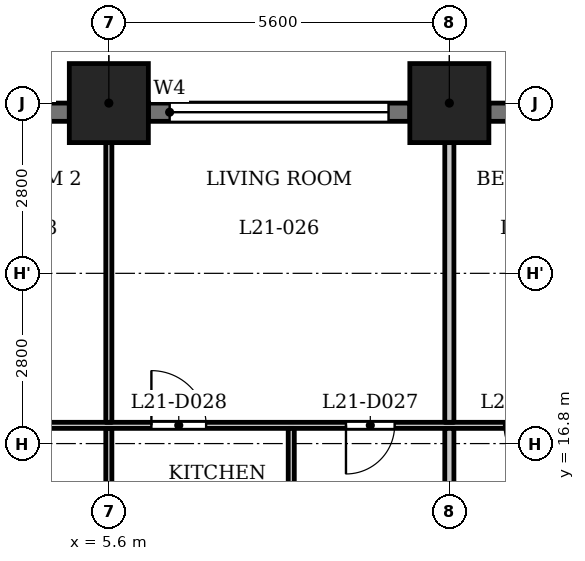
"""IFC4 building model, lengths in metres.
Left out: names, types, materials, properties, quantities, classifications, styles, units other than length and angle.
Written with IfcOpenShell. Run it as: python <this file> out.ifc"""

import sys

from ifc_helpers import new_model, si_unit, direction, frame, frame_2d, origin, origin_2d, place, context, subcontext, project, spatial, rectangle, extrude, element, fill, save


model = new_model("IFC4")
c1 = context("Model", 3, precision=1e-05, world=origin(), true_north=direction((0.0, 1.0)))
c2 = subcontext(c1, "Body", "Model", "MODEL_VIEW")
j1 = project(units=[si_unit("LENGTHUNIT", "METRE"), si_unit("PLANEANGLEUNIT", "RADIAN")], contexts=[c1])
p1 = place(None, origin())
s1 = spatial("IfcSite", under=j1, at=p1, CompositionType="ELEMENT")
p2 = place(p1, origin())
s2 = spatial("IfcBuilding", under=s1, at=p2, CompositionType="ELEMENT")
p3 = place(p2, frame((0.0, 0.0, 86.8)))
s3 = spatial("IfcBuildingStorey", under=s2, at=p3, CompositionType="ELEMENT", Elevation=86.8)
for number, where, z_axis, x_axis in (
    (1, (11.2, 22.4, 0.0), (0.0, 0.0, 1.0), (1.0, 0.0, 0.0)),
    (2, (5.6, 22.4, 0.0), (0.0, 0.0, 1.0), (1.0, 0.0, 0.0)),
):
    element("IfcColumn", number, at=place(p3, frame(where, z_axis=z_axis, x_axis=x_axis)), inside=s3, PredefinedType="COLUMN", context=c2, shape_type="SweptSolid", body=[
        extrude(rectangle(XDim=1.3, YDim=1.3, at=origin_2d()), origin(), (0.0, 0.0, 1.0), 3.5),
    ])
p4 = place(p3, frame((16.15, 22.25, 0.0), z_axis=(0.0, 0.0, 1.0), x_axis=(-1.0, 0.0, 0.0)))
e3 = element("IfcWall", 3, at=p4, inside=s3, PredefinedType="SOLIDWALL", context=c2, shape_type="SweptSolid", body=[
    extrude(rectangle(XDim=4.3, YDim=0.3, at=frame_2d((2.15, 0.0))), origin(), (0.0, 0.0, 1.0), 2.4),
])
p5 = place(p4, frame((0.337, 0.0, 0.6)))
e4 = element("IfcOpeningElement", 4, at=p5, cuts=e3, PredefinedType="OPENING", context=c2, shape_type="SweptSolid", body=[
    extrude(rectangle(XDim=1.2, YDim=1.55, at=frame_2d((0.6, 0.775))), frame((0.0, 0.16, 0.0), z_axis=(0.0, -1.0, 0.0), x_axis=(1.0, 0.0, 0.0)), (0.0, 0.0, 1.0), 0.32),
])
p6 = place(p4, frame((2.562, 0.0, 0.6)))
e5 = element("IfcOpeningElement", 5, at=p6, cuts=e3, PredefinedType="OPENING", context=c2, shape_type="SweptSolid", body=[
    extrude(rectangle(XDim=1.2, YDim=1.55, at=frame_2d((0.6, 0.775))), frame((0.0, 0.16, 0.0), z_axis=(0.0, -1.0, 0.0), x_axis=(1.0, 0.0, 0.0)), (0.0, 0.0, 1.0), 0.32),
])
p7 = place(p3, frame((10.55, 22.25, 0.0), z_axis=(0.0, 0.0, 1.0), x_axis=(-1.0, 0.0, 0.0)))
e6 = element("IfcWall", 6, at=p7, inside=s3, PredefinedType="SOLIDWALL", context=c2, shape_type="SweptSolid", body=[
    extrude(rectangle(XDim=4.3, YDim=0.3, at=frame_2d((2.15, 0.0))), origin(), (0.0, 0.0, 1.0), 2.4),
])
p8 = place(p7, frame((0.35, 0.0, 1.2)))
e7 = element("IfcOpeningElement", 7, at=p8, cuts=e6, PredefinedType="OPENING", context=c2, shape_type="SweptSolid", body=[
    extrude(rectangle(XDim=3.6, YDim=0.95, at=frame_2d((1.8, 0.475))), frame((0.0, 0.16, 0.0), z_axis=(0.0, -1.0, 0.0), x_axis=(1.0, 0.0, 0.0)), (0.0, 0.0, 1.0), 0.32),
])
p9 = place(p3, frame((4.95, 22.25, 0.0), z_axis=(0.0, 0.0, 1.0), x_axis=(-1.0, 0.0, 0.0)))
e8 = element("IfcWall", 8, at=p9, inside=s3, PredefinedType="SOLIDWALL", context=c2, shape_type="SweptSolid", body=[
    extrude(rectangle(XDim=4.3, YDim=0.3, at=frame_2d((2.15, 0.0))), origin(), (0.0, 0.0, 1.0), 2.4),
])
p10 = place(p9, frame((0.538, 0.0, 0.6)))
e9 = element("IfcOpeningElement", 9, at=p10, cuts=e8, PredefinedType="OPENING", context=c2, shape_type="SweptSolid", body=[
    extrude(rectangle(XDim=1.2, YDim=1.55, at=frame_2d((0.6, 0.775))), frame((0.0, 0.16, 0.0), z_axis=(0.0, -1.0, 0.0), x_axis=(1.0, 0.0, 0.0)), (0.0, 0.0, 1.0), 0.32),
])
p11 = place(p9, frame((2.762, 0.0, 0.6)))
e10 = element("IfcOpeningElement", 10, at=p11, cuts=e8, PredefinedType="OPENING", context=c2, shape_type="SweptSolid", body=[
    extrude(rectangle(XDim=1.2, YDim=1.55, at=frame_2d((0.6, 0.775))), frame((0.0, 0.16, 0.0), z_axis=(0.0, -1.0, 0.0), x_axis=(1.0, 0.0, 0.0)), (0.0, 0.0, 1.0), 0.32),
])
p12 = place(p3, frame((-16.725, 17.1, 0.0), z_axis=(0.0, 0.0, 1.0), x_axis=(1.0, 0.0, 0.0)))
e11 = element("IfcWall", 11, at=p12, inside=s3, PredefinedType="PARTITIONING", context=c2, shape_type="SweptSolid", body=[
    extrude(rectangle(XDim=33.45, YDim=0.1, at=frame_2d((16.725, 0.0))), origin(), (0.0, 0.0, 1.0), 3.2),
])
p13 = place(p12, frame((3.925, 0.0, 0.0)))
e12 = element("IfcOpeningElement", 12, at=p13, cuts=e11, PredefinedType="OPENING", context=c2, shape_type="SweptSolid", body=[
    extrude(rectangle(XDim=0.8, YDim=2.1, at=frame_2d((0.4, 1.05))), frame((0.0, 0.06, 0.0), z_axis=(0.0, -1.0, 0.0), x_axis=(1.0, 0.0, 0.0)), (0.0, 0.0, 1.0), 0.12),
])
p14 = place(p12, frame((0.975, 0.0, 0.0)))
e13 = element("IfcOpeningElement", 13, at=p14, cuts=e11, PredefinedType="OPENING", context=c2, shape_type="SweptSolid", body=[
    extrude(rectangle(XDim=0.9, YDim=2.1, at=frame_2d((0.45, 1.05))), frame((0.0, 0.06, 0.0), z_axis=(0.0, -1.0, 0.0), x_axis=(1.0, 0.0, 0.0)), (0.0, 0.0, 1.0), 0.12),
])
p15 = place(p12, frame((6.425, 0.0, 0.0)))
e14 = element("IfcOpeningElement", 14, at=p15, cuts=e11, PredefinedType="OPENING", context=c2, shape_type="SweptSolid", body=[
    extrude(rectangle(XDim=0.8, YDim=2.1, at=frame_2d((0.4, 1.05))), frame((0.0, 0.06, 0.0), z_axis=(0.0, -1.0, 0.0), x_axis=(1.0, 0.0, 0.0)), (0.0, 0.0, 1.0), 0.12),
])
p16 = place(p12, frame((8.825, 0.0, 0.0)))
e15 = element("IfcOpeningElement", 15, at=p16, cuts=e11, PredefinedType="OPENING", context=c2, shape_type="SweptSolid", body=[
    extrude(rectangle(XDim=0.9, YDim=2.1, at=frame_2d((0.45, 1.05))), frame((0.0, 0.06, 0.0), z_axis=(0.0, -1.0, 0.0), x_axis=(1.0, 0.0, 0.0)), (0.0, 0.0, 1.0), 0.12),
])
p17 = place(p12, frame((12.375, 0.0, 0.0)))
e16 = element("IfcOpeningElement", 16, at=p17, cuts=e11, PredefinedType="OPENING", context=c2, shape_type="SweptSolid", body=[
    extrude(rectangle(XDim=0.9, YDim=2.1, at=frame_2d((0.45, 1.05))), frame((0.0, 0.06, 0.0), z_axis=(0.0, -1.0, 0.0), x_axis=(1.0, 0.0, 0.0)), (0.0, 0.0, 1.0), 0.12),
])
p18 = place(p12, frame((14.425, 0.0, 0.0)))
e17 = element("IfcOpeningElement", 17, at=p18, cuts=e11, PredefinedType="OPENING", context=c2, shape_type="SweptSolid", body=[
    extrude(rectangle(XDim=0.9, YDim=2.1, at=frame_2d((0.45, 1.05))), frame((0.0, 0.06, 0.0), z_axis=(0.0, -1.0, 0.0), x_axis=(1.0, 0.0, 0.0)), (0.0, 0.0, 1.0), 0.12),
])
p19 = place(p12, frame((26.225, 0.0, 0.0)))
e18 = element("IfcOpeningElement", 18, at=p19, cuts=e11, PredefinedType="OPENING", context=c2, shape_type="SweptSolid", body=[
    extrude(rectangle(XDim=0.8, YDim=2.1, at=frame_2d((0.4, 1.05))), frame((0.0, 0.06, 0.0), z_axis=(0.0, -1.0, 0.0), x_axis=(1.0, 0.0, 0.0)), (0.0, 0.0, 1.0), 0.12),
])
p20 = place(p12, frame((23.025, 0.0, 0.0)))
e19 = element("IfcOpeningElement", 19, at=p20, cuts=e11, PredefinedType="OPENING", context=c2, shape_type="SweptSolid", body=[
    extrude(rectangle(XDim=0.9, YDim=2.1, at=frame_2d((0.45, 1.05))), frame((0.0, 0.06, 0.0), z_axis=(0.0, -1.0, 0.0), x_axis=(1.0, 0.0, 0.0)), (0.0, 0.0, 1.0), 0.12),
])
p21 = place(p12, frame((17.775, 0.0, 0.0)))
e20 = element("IfcOpeningElement", 20, at=p21, cuts=e11, PredefinedType="OPENING", context=c2, shape_type="SweptSolid", body=[
    extrude(rectangle(XDim=0.9, YDim=2.1, at=frame_2d((0.45, 1.05))), frame((0.0, 0.06, 0.0), z_axis=(0.0, -1.0, 0.0), x_axis=(1.0, 0.0, 0.0)), (0.0, 0.0, 1.0), 0.12),
])
p22 = place(p12, frame((20.025, 0.0, 0.0)))
e21 = element("IfcOpeningElement", 21, at=p22, cuts=e11, PredefinedType="OPENING", context=c2, shape_type="SweptSolid", body=[
    extrude(rectangle(XDim=0.9, YDim=2.1, at=frame_2d((0.45, 1.05))), frame((0.0, 0.06, 0.0), z_axis=(0.0, -1.0, 0.0), x_axis=(1.0, 0.0, 0.0)), (0.0, 0.0, 1.0), 0.12),
])
p23 = place(p12, frame((28.825, 0.0, 0.0)))
e22 = element("IfcOpeningElement", 22, at=p23, cuts=e11, PredefinedType="OPENING", context=c2, shape_type="SweptSolid", body=[
    extrude(rectangle(XDim=0.8, YDim=2.1, at=frame_2d((0.4, 1.05))), frame((0.0, 0.06, 0.0), z_axis=(0.0, -1.0, 0.0), x_axis=(1.0, 0.0, 0.0)), (0.0, 0.0, 1.0), 0.12),
])
p24 = place(p12, frame((31.975, 0.0, 0.0)))
e23 = element("IfcOpeningElement", 23, at=p24, cuts=e11, PredefinedType="OPENING", context=c2, shape_type="SweptSolid", body=[
    extrude(rectangle(XDim=0.9, YDim=2.1, at=frame_2d((0.45, 1.05))), frame((0.0, 0.06, 0.0), z_axis=(0.0, -1.0, 0.0), x_axis=(1.0, 0.0, 0.0)), (0.0, 0.0, 1.0), 0.12),
])
p25 = place(p3, frame((5.6, 13.275, 0.0), z_axis=(0.0, 0.0, 1.0), x_axis=(0.0, 1.0, 0.0)))
e24 = element("IfcWall", 24, at=p25, inside=s3, PredefinedType="PARTITIONING", context=c2, shape_type="SweptSolid", body=[
    extrude(rectangle(XDim=3.775, YDim=0.1, at=frame_2d((1.888, 0.0))), origin(), (0.0, 0.0, 1.0), 3.2),
])
p26 = place(p25, frame((0.576, 0.0, 0.0)))
e25 = element("IfcOpeningElement", 25, at=p26, cuts=e24, PredefinedType="OPENING", context=c2, shape_type="SweptSolid", body=[
    extrude(rectangle(XDim=0.9, YDim=2.1, at=frame_2d((0.45, 1.05))), frame((0.0, 0.06, 0.0), z_axis=(0.0, -1.0, 0.0), x_axis=(1.0, 0.0, 0.0)), (0.0, 0.0, 1.0), 0.12),
])
p27 = place(p3, frame((5.6, 17.15, 0.0), z_axis=(0.0, 0.0, 1.0), x_axis=(0.0, 1.0, 0.0)))
e26 = element("IfcWall", 26, at=p27, inside=s3, PredefinedType="PARTITIONING", context=c2, shape_type="SweptSolid", body=[
    extrude(rectangle(XDim=5.88, YDim=0.1, at=frame_2d((2.94, 0.0))), origin(), (0.0, 0.0, 1.0), 3.2),
])
p28 = place(p3, frame((8.6, 13.275, 0.0), z_axis=(0.0, 0.0, 1.0), x_axis=(0.0, 1.0, 0.0)))
e27 = element("IfcWall", 27, at=p28, inside=s3, PredefinedType="PARTITIONING", context=c2, shape_type="SweptSolid", body=[
    extrude(rectangle(XDim=3.775, YDim=0.1, at=frame_2d((1.888, 0.0))), origin(), (0.0, 0.0, 1.0), 3.2),
])
p29 = place(p3, frame((11.2, 13.275, 0.0), z_axis=(0.0, 0.0, 1.0), x_axis=(0.0, 1.0, 0.0)))
e28 = element("IfcWall", 28, at=p29, inside=s3, PredefinedType="PARTITIONING", context=c2, shape_type="SweptSolid", body=[
    extrude(rectangle(XDim=3.775, YDim=0.15, at=frame_2d((1.888, 0.0))), origin(), (0.0, 0.0, 1.0), 3.2),
])
p30 = place(p3, frame((11.2, 17.15, 0.0), z_axis=(0.0, 0.0, 1.0), x_axis=(0.0, 1.0, 0.0)))
e29 = element("IfcWall", 29, at=p30, inside=s3, PredefinedType="PARTITIONING", context=c2, shape_type="SweptSolid", body=[
    extrude(rectangle(XDim=5.88, YDim=0.15, at=frame_2d((2.94, 0.0))), origin(), (0.0, 0.0, 1.0), 3.2),
])
p31 = place(p19, origin())
e30 = element("IfcDoor", 30, at=p31, inside=s3, OperationType="SINGLE_SWING_LEFT", PredefinedType="DOOR", context=c2, shape_type="SweptSolid", body=[
    extrude(rectangle(XDim=0.8, YDim=2.1, at=frame_2d((0.4, 1.05))), frame((0.0, 0.025, 0.0), z_axis=(0.0, -1.0, 0.0), x_axis=(1.0, 0.0, 0.0)), (0.0, 0.0, 1.0), 0.05),
])
fill(e18, e30)
p32 = place(p20, origin())
e31 = element("IfcDoor", 31, at=p32, inside=s3, OperationType="SINGLE_SWING_RIGHT", PredefinedType="DOOR", context=c2, shape_type="SweptSolid", body=[
    extrude(rectangle(XDim=0.9, YDim=2.1, at=frame_2d((0.45, 1.05))), frame((0.0, 0.025, 0.0), z_axis=(0.0, -1.0, 0.0), x_axis=(1.0, 0.0, 0.0)), (0.0, 0.0, 1.0), 0.05),
])
fill(e19, e31)
p33 = place(p23, origin())
e32 = element("IfcDoor", 32, at=p33, inside=s3, OperationType="SINGLE_SWING_RIGHT", PredefinedType="DOOR", context=c2, shape_type="SweptSolid", body=[
    extrude(rectangle(XDim=0.8, YDim=2.1, at=frame_2d((0.4, 1.05))), frame((0.0, 0.025, 0.0), z_axis=(0.0, -1.0, 0.0), x_axis=(1.0, 0.0, 0.0)), (0.0, 0.0, 1.0), 0.05),
])
fill(e22, e32)
p34 = place(p8, origin())
e33 = element("IfcWindow", 33, at=p34, inside=s3, PartitioningType="SINGLE_PANEL", PredefinedType="WINDOW", context=c2, shape_type="SweptSolid", body=[
    extrude(rectangle(XDim=3.6, YDim=0.95, at=frame_2d((1.8, 0.475))), frame((0.0, 0.03, 0.0), z_axis=(0.0, -1.0, 0.0), x_axis=(1.0, 0.0, 0.0)), (0.0, 0.0, 1.0), 0.06),
])
fill(e7, e33)
save(model, sys.argv[1])
